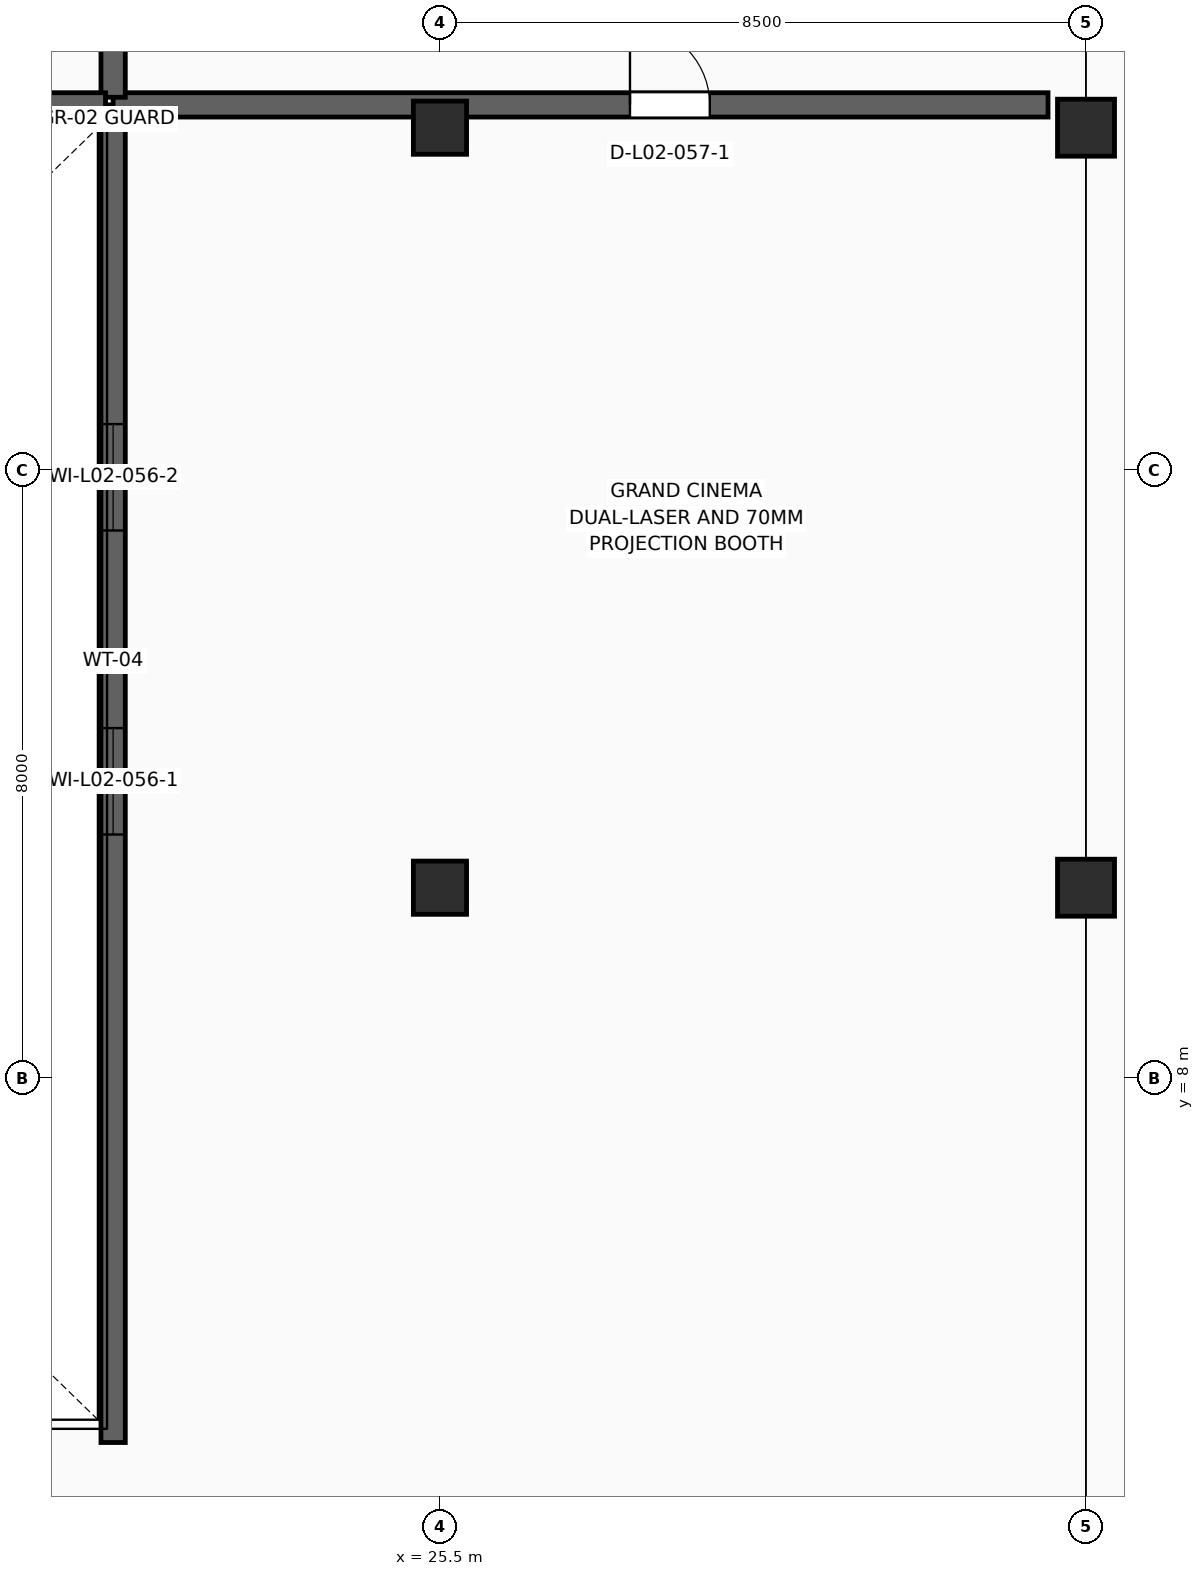
"""IFC4 building model, lengths in metres.
Left out: names, types, materials, properties, quantities, classifications, styles, units other than length and angle.
Written with IfcOpenShell. Run it as: python <this file> out.ifc"""

import sys

from ifc_helpers import new_model, si_unit, direction, frame, frame_2d, origin, origin_2d, place, context, subcontext, project, spatial, rectangle, extrude, element, fill, save


model = new_model("IFC4")
c1 = context("Model", 3, precision=1e-05, world=origin(), true_north=direction((0.0, 1.0)))
c2 = subcontext(c1, "Body", "Model", "MODEL_VIEW")
j1 = project(units=[si_unit("LENGTHUNIT", "METRE"), si_unit("PLANEANGLEUNIT", "RADIAN")], contexts=[c1])
p1 = place(None, origin())
s1 = spatial("IfcSite", under=j1, at=p1, CompositionType="ELEMENT")
p2 = place(p1, origin())
s2 = spatial("IfcBuilding", under=s1, at=p2, CompositionType="ELEMENT")
p3 = place(p2, frame((0.0, 0.0, 10.2)))
s3 = spatial("IfcBuildingStorey", under=s2, at=p3, CompositionType="ELEMENT", Elevation=10.2)
for number, where, z_axis, x_axis in (
    (1, (25.5, 10.5, 0.0), (0.0, 0.0, 1.0), (1.0, 0.0, 0.0)),
    (2, (25.5, 20.5, 0.0), (0.0, 0.0, 1.0), (1.0, 0.0, 0.0)),
):
    element("IfcColumn", number, at=place(p3, frame(where, z_axis=z_axis, x_axis=x_axis)), inside=s3, PredefinedType="COLUMN", context=c2, shape_type="SweptSolid", body=[
        extrude(rectangle(XDim=0.7, YDim=0.7, at=origin_2d()), origin(), (0.0, 0.0, 1.0), 4.7),
    ])
for number, where, z_axis, x_axis in (
    (3, (34.0, 10.5, 0.0), (0.0, 0.0, 1.0), (1.0, 0.0, 0.0)),
    (4, (34.0, 20.5, 0.0), (0.0, 0.0, 1.0), (1.0, 0.0, 0.0)),
):
    element("IfcColumn", number, at=place(p3, frame(where, z_axis=z_axis, x_axis=x_axis)), inside=s3, PredefinedType="COLUMN", context=c2, shape_type="SweptSolid", body=[
        extrude(rectangle(XDim=0.75, YDim=0.75, at=origin_2d()), origin(), (0.0, 0.0, 1.0), 4.7),
    ])
p4 = place(p3, frame((21.2, 3.2, 0.0), z_axis=(0.0, 0.0, 1.0), x_axis=(0.0, 1.0, 0.0)))
e5 = element("IfcWall", 5, at=p4, inside=s3, PredefinedType="SHEAR", context=c2, shape_type="SweptSolid", body=[
    extrude(rectangle(XDim=17.6, YDim=0.32, at=frame_2d((8.8, 0.0))), origin(), (0.0, 0.0, 1.0), 4.5),
])
p5 = place(p4, frame((8.0, 0.0, 1.2)))
e6 = element("IfcOpeningElement", 6, at=p5, cuts=e5, PredefinedType="OPENING", context=c2, shape_type="SweptSolid", body=[
    extrude(rectangle(XDim=1.4, YDim=1.0, at=frame_2d((0.7, 0.5))), frame((0.0, 0.172, 0.0), z_axis=(0.0, -1.0, 0.0), x_axis=(1.0, 0.0, 0.0)), (0.0, 0.0, 1.0), 0.344),
])
p6 = place(p4, frame((12.0, 0.0, 1.2)))
e7 = element("IfcOpeningElement", 7, at=p6, cuts=e5, PredefinedType="OPENING", context=c2, shape_type="SweptSolid", body=[
    extrude(rectangle(XDim=1.4, YDim=1.0, at=frame_2d((0.7, 0.5))), frame((0.0, 0.172, 0.0), z_axis=(0.0, -1.0, 0.0), x_axis=(1.0, 0.0, 0.0)), (0.0, 0.0, 1.0), 0.344),
])
p7 = place(p3, frame((21.2, 20.8, 0.0), z_axis=(0.0, 0.0, 1.0), x_axis=(1.0, 0.0, 0.0)))
e8 = element("IfcWall", 8, at=p7, inside=s3, PredefinedType="SHEAR", context=c2, shape_type="SweptSolid", body=[
    extrude(rectangle(XDim=12.3, YDim=0.32, at=frame_2d((6.15, 0.0))), origin(), (0.0, 0.0, 1.0), 4.5),
])
p8 = place(p7, frame((6.8, 0.0, 0.0)))
e9 = element("IfcOpeningElement", 9, at=p8, cuts=e8, PredefinedType="OPENING", context=c2, shape_type="SweptSolid", body=[
    extrude(rectangle(XDim=1.05, YDim=2.15, at=frame_2d((0.525, 1.075))), frame((0.0, 0.172, 0.0), z_axis=(0.0, -1.0, 0.0), x_axis=(1.0, 0.0, 0.0)), (0.0, 0.0, 1.0), 0.344),
])
p9 = place(p3, frame((21.2, 20.9, 0.0), z_axis=(0.0, 0.0, 1.0), x_axis=(0.0, 1.0, 0.0)))
e10 = element("IfcWall", 10, at=p9, inside=s3, PredefinedType="SHEAR", context=c2, shape_type="SweptSolid", body=[
    extrude(rectangle(XDim=10.7, YDim=0.32, at=frame_2d((5.35, 0.0))), origin(), (0.0, 0.0, 1.0), 4.5),
])
p10 = place(p9, frame((3.5, 0.0, 0.0)))
e11 = element("IfcOpeningElement", 11, at=p10, cuts=e10, PredefinedType="OPENING", context=c2, shape_type="SweptSolid", body=[
    extrude(rectangle(XDim=0.9, YDim=2.1, at=frame_2d((0.45, 1.05))), frame((0.0, 0.172, 0.0), z_axis=(0.0, -1.0, 0.0), x_axis=(1.0, 0.0, 0.0)), (0.0, 0.0, 1.0), 0.344),
])
p11 = place(p3, frame((3.2, 20.8, 0.0), z_axis=(0.0, 0.0, 1.0), x_axis=(1.0, 0.0, 0.0)))
e12 = element("IfcWall", 12, at=p11, inside=s3, PredefinedType="SHEAR", context=c2, shape_type="SweptSolid", body=[
    extrude(rectangle(XDim=17.9, YDim=0.32, at=frame_2d((8.95, 0.0))), origin(), (0.0, 0.0, 1.0), 4.5),
])
p12 = place(p5, origin())
e13 = element("IfcWindow", 13, at=p12, inside=s3, PartitioningType="SINGLE_PANEL", PredefinedType="WINDOW", context=c2, shape_type="SweptSolid", body=[
    extrude(rectangle(XDim=1.4, YDim=1.0, at=frame_2d((0.7, 0.5))), frame((0.0, 0.03, 0.0), z_axis=(0.0, -1.0, 0.0), x_axis=(1.0, 0.0, 0.0)), (0.0, 0.0, 1.0), 0.06),
])
fill(e6, e13)
p13 = place(p6, origin())
e14 = element("IfcWindow", 14, at=p13, inside=s3, PartitioningType="SINGLE_PANEL", PredefinedType="WINDOW", context=c2, shape_type="SweptSolid", body=[
    extrude(rectangle(XDim=1.4, YDim=1.0, at=frame_2d((0.7, 0.5))), frame((0.0, 0.03, 0.0), z_axis=(0.0, -1.0, 0.0), x_axis=(1.0, 0.0, 0.0)), (0.0, 0.0, 1.0), 0.06),
])
fill(e7, e14)
p14 = place(p8, origin())
e15 = element("IfcDoor", 15, at=p14, inside=s3, OperationType="SINGLE_SWING_LEFT", PredefinedType="DOOR", context=c2, shape_type="SweptSolid", body=[
    extrude(rectangle(XDim=1.05, YDim=2.15, at=frame_2d((0.525, 1.075))), frame((0.0, 0.025, 0.0), z_axis=(0.0, -1.0, 0.0), x_axis=(1.0, 0.0, 0.0)), (0.0, 0.0, 1.0), 0.05),
])
fill(e9, e15)
save(model, sys.argv[1])
